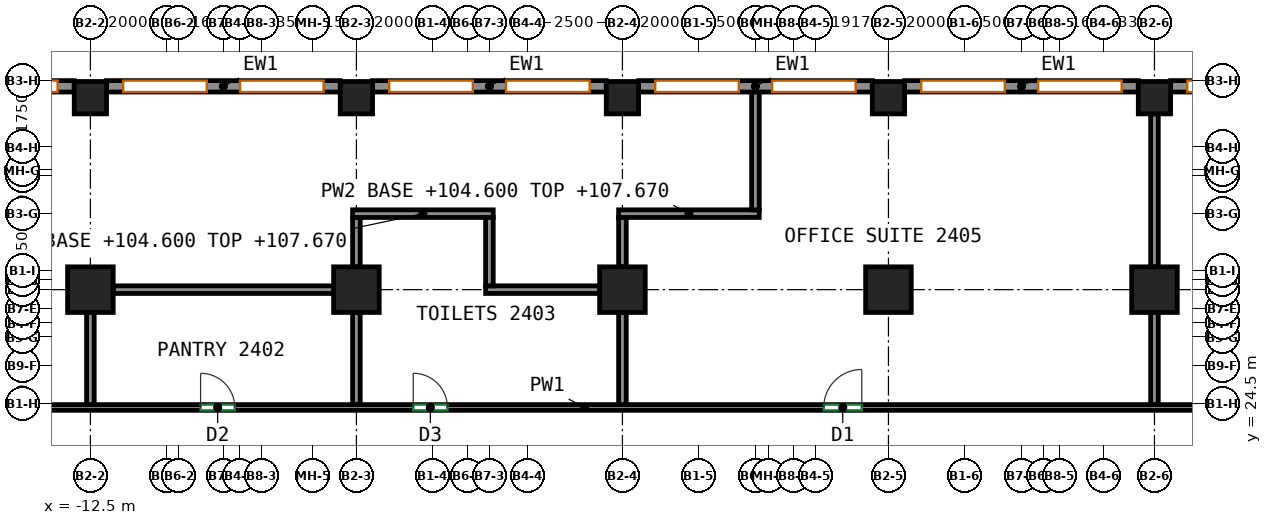
"""IFC4 building model, lengths in metres.
Left out: names, types, materials, properties, quantities, classifications, styles, units other than length and angle.
Written with IfcOpenShell. Run it as: python <this file> out.ifc"""

import sys

from ifc_helpers import new_model, si_unit, direction, frame, frame_2d, origin, origin_2d, place, context, subcontext, project, spatial, rectangle, extrude, source, transform, mapped, element, fill, save


model = new_model("IFC4")
c1 = context("Model", 3, precision=1e-05, world=origin(), true_north=direction((0.0, 1.0)))
c2 = subcontext(c1, "Body", "Model", "MODEL_VIEW")
j1 = project(units=[si_unit("LENGTHUNIT", "METRE"), si_unit("PLANEANGLEUNIT", "RADIAN")], contexts=[c1])
p1 = place(None, origin())
s1 = spatial("IfcSite", under=j1, at=p1, CompositionType="ELEMENT")
p2 = place(p1, origin())
s2 = spatial("IfcBuilding", under=s1, at=p2, CompositionType="ELEMENT")
p3 = place(p2, frame((0.0, 0.0, 104.6)))
s3 = spatial("IfcBuildingStorey", under=s2, at=p3, CompositionType="ELEMENT", Elevation=104.6)
m1 = source(origin(), c2, "Body", "SweptSolid", [
    extrude(rectangle(XDim=1.2, YDim=1.2, at=origin_2d()), origin(), (0.0, 0.0, 1.0), 3.72),
])
p4 = place(p3, frame((-12.5, 27.5, 0.0), z_axis=(0.0, 0.0, 1.0), x_axis=(1.0, 0.0, 0.0)))
e1 = element("IfcColumn", 1, at=p4, inside=s3, PredefinedType="COLUMN", context=c2, shape_type="MappedRepresentation", body=[
    mapped(m1, transform((0.0, 0.0, 0.0))),
])
m2 = source(origin(), c2, "Body", "SweptSolid", [
    extrude(rectangle(XDim=0.85, YDim=0.85, at=origin_2d()), origin(), (0.0, 0.0, 1.0), 3.72),
])
p5 = place(p3, frame((-12.5, 32.55, 0.0), z_axis=(0.0, 0.0, 1.0), x_axis=(1.0, 0.0, 0.0)))
e2 = element("IfcColumn", 2, at=p5, inside=s3, PredefinedType="COLUMN", context=c2, shape_type="MappedRepresentation", body=[
    mapped(m2, transform((0.0, 0.0, 0.0))),
])
p6 = place(p3, frame((-5.5, 27.5, 0.0), z_axis=(0.0, 0.0, 1.0), x_axis=(1.0, 0.0, 0.0)))
e3 = element("IfcColumn", 3, at=p6, inside=s3, PredefinedType="COLUMN", context=c2, shape_type="MappedRepresentation", body=[
    mapped(m1, transform((0.0, 0.0, 0.0))),
])
p7 = place(p3, frame((-5.5, 32.55, 0.0), z_axis=(0.0, 0.0, 1.0), x_axis=(1.0, 0.0, 0.0)))
e4 = element("IfcColumn", 4, at=p7, inside=s3, PredefinedType="COLUMN", context=c2, shape_type="MappedRepresentation", body=[
    mapped(m2, transform((0.0, 0.0, 0.0))),
])
p8 = place(p3, frame((1.5, 27.5, 0.0), z_axis=(0.0, 0.0, 1.0), x_axis=(1.0, 0.0, 0.0)))
e5 = element("IfcColumn", 5, at=p8, inside=s3, PredefinedType="COLUMN", context=c2, shape_type="MappedRepresentation", body=[
    mapped(m1, transform((0.0, 0.0, 0.0))),
])
p9 = place(p3, frame((1.5, 32.55, 0.0), z_axis=(0.0, 0.0, 1.0), x_axis=(1.0, 0.0, 0.0)))
e6 = element("IfcColumn", 6, at=p9, inside=s3, PredefinedType="COLUMN", context=c2, shape_type="MappedRepresentation", body=[
    mapped(m2, transform((0.0, 0.0, 0.0))),
])
p10 = place(p3, frame((8.5, 27.5, 0.0), z_axis=(0.0, 0.0, 1.0), x_axis=(1.0, 0.0, 0.0)))
e7 = element("IfcColumn", 7, at=p10, inside=s3, PredefinedType="COLUMN", context=c2, shape_type="MappedRepresentation", body=[
    mapped(m1, transform((0.0, 0.0, 0.0))),
])
p11 = place(p3, frame((8.5, 32.55, 0.0), z_axis=(0.0, 0.0, 1.0), x_axis=(1.0, 0.0, 0.0)))
e8 = element("IfcColumn", 8, at=p11, inside=s3, PredefinedType="COLUMN", context=c2, shape_type="MappedRepresentation", body=[
    mapped(m2, transform((0.0, 0.0, 0.0))),
])
p12 = place(p3, frame((15.5, 27.5, 0.0), z_axis=(0.0, 0.0, 1.0), x_axis=(1.0, 0.0, 0.0)))
e9 = element("IfcColumn", 9, at=p12, inside=s3, PredefinedType="COLUMN", context=c2, shape_type="MappedRepresentation", body=[
    mapped(m1, transform((0.0, 0.0, 0.0))),
])
p13 = place(p3, frame((15.5, 32.55, 0.0), z_axis=(0.0, 0.0, 1.0), x_axis=(1.0, 0.0, 0.0)))
e10 = element("IfcColumn", 10, at=p13, inside=s3, PredefinedType="COLUMN", context=c2, shape_type="MappedRepresentation", body=[
    mapped(m2, transform((0.0, 0.0, 0.0))),
])
m3 = source(origin(), c2, "Body", "SweptSolid", [
    extrude(rectangle(XDim=6.15, YDim=0.3, at=frame_2d((3.075, 0.0))), origin(), (0.0, 0.0, 1.0), 3.72),
])
p14 = place(p3, frame((22.075, 32.85, 0.0), z_axis=(0.0, 0.0, 1.0), x_axis=(-1.0, 0.0, 0.0)))
e11 = element("IfcWall", 11, at=p14, inside=s3, PredefinedType="SOLIDWALL", context=c2, shape_type="MappedRepresentation", body=[
    mapped(m3, transform((0.0, 0.0, 0.0))),
])
p15 = place(p14, frame((0.438, 0.0, 0.7)))
e12 = element("IfcOpeningElement", 12, at=p15, cuts=e11, PredefinedType="OPENING", context=c2, shape_type="SweptSolid", body=[
    extrude(rectangle(XDim=2.2, YDim=2.25, at=frame_2d((1.1, 1.125))), frame((0.0, 0.16, 0.0), z_axis=(0.0, -1.0, 0.0), x_axis=(1.0, 0.0, 0.0)), (0.0, 0.0, 1.0), 0.32),
])
p16 = place(p14, frame((3.512, 0.0, 0.7)))
e13 = element("IfcOpeningElement", 13, at=p16, cuts=e11, PredefinedType="OPENING", context=c2, shape_type="SweptSolid", body=[
    extrude(rectangle(XDim=2.2, YDim=2.25, at=frame_2d((1.1, 1.125))), frame((0.0, 0.16, 0.0), z_axis=(0.0, -1.0, 0.0), x_axis=(1.0, 0.0, 0.0)), (0.0, 0.0, 1.0), 0.32),
])
p17 = place(p3, frame((15.075, 32.85, 0.0), z_axis=(0.0, 0.0, 1.0), x_axis=(-1.0, 0.0, 0.0)))
e14 = element("IfcWall", 14, at=p17, inside=s3, PredefinedType="SOLIDWALL", context=c2, shape_type="MappedRepresentation", body=[
    mapped(m3, transform((0.0, 0.0, 0.0))),
])
p18 = place(p17, frame((0.438, 0.0, 0.7)))
e15 = element("IfcOpeningElement", 15, at=p18, cuts=e14, PredefinedType="OPENING", context=c2, shape_type="SweptSolid", body=[
    extrude(rectangle(XDim=2.2, YDim=2.25, at=frame_2d((1.1, 1.125))), frame((0.0, 0.16, 0.0), z_axis=(0.0, -1.0, 0.0), x_axis=(1.0, 0.0, 0.0)), (0.0, 0.0, 1.0), 0.32),
])
p19 = place(p17, frame((3.512, 0.0, 0.7)))
e16 = element("IfcOpeningElement", 16, at=p19, cuts=e14, PredefinedType="OPENING", context=c2, shape_type="SweptSolid", body=[
    extrude(rectangle(XDim=2.2, YDim=2.25, at=frame_2d((1.1, 1.125))), frame((0.0, 0.16, 0.0), z_axis=(0.0, -1.0, 0.0), x_axis=(1.0, 0.0, 0.0)), (0.0, 0.0, 1.0), 0.32),
])
p20 = place(p3, frame((8.075, 32.85, 0.0), z_axis=(0.0, 0.0, 1.0), x_axis=(-1.0, 0.0, 0.0)))
e17 = element("IfcWall", 17, at=p20, inside=s3, PredefinedType="SOLIDWALL", context=c2, shape_type="MappedRepresentation", body=[
    mapped(m3, transform((0.0, 0.0, 0.0))),
])
p21 = place(p20, frame((0.438, 0.0, 0.7)))
e18 = element("IfcOpeningElement", 18, at=p21, cuts=e17, PredefinedType="OPENING", context=c2, shape_type="SweptSolid", body=[
    extrude(rectangle(XDim=2.2, YDim=2.25, at=frame_2d((1.1, 1.125))), frame((0.0, 0.16, 0.0), z_axis=(0.0, -1.0, 0.0), x_axis=(1.0, 0.0, 0.0)), (0.0, 0.0, 1.0), 0.32),
])
p22 = place(p20, frame((3.512, 0.0, 0.7)))
e19 = element("IfcOpeningElement", 19, at=p22, cuts=e17, PredefinedType="OPENING", context=c2, shape_type="SweptSolid", body=[
    extrude(rectangle(XDim=2.2, YDim=2.25, at=frame_2d((1.1, 1.125))), frame((0.0, 0.16, 0.0), z_axis=(0.0, -1.0, 0.0), x_axis=(1.0, 0.0, 0.0)), (0.0, 0.0, 1.0), 0.32),
])
p23 = place(p3, frame((1.075, 32.85, 0.0), z_axis=(0.0, 0.0, 1.0), x_axis=(-1.0, 0.0, 0.0)))
e20 = element("IfcWall", 20, at=p23, inside=s3, PredefinedType="SOLIDWALL", context=c2, shape_type="MappedRepresentation", body=[
    mapped(m3, transform((0.0, 0.0, 0.0))),
])
p24 = place(p23, frame((0.438, 0.0, 0.7)))
e21 = element("IfcOpeningElement", 21, at=p24, cuts=e20, PredefinedType="OPENING", context=c2, shape_type="SweptSolid", body=[
    extrude(rectangle(XDim=2.2, YDim=2.25, at=frame_2d((1.1, 1.125))), frame((0.0, 0.16, 0.0), z_axis=(0.0, -1.0, 0.0), x_axis=(1.0, 0.0, 0.0)), (0.0, 0.0, 1.0), 0.32),
])
p25 = place(p23, frame((3.512, 0.0, 0.7)))
e22 = element("IfcOpeningElement", 22, at=p25, cuts=e20, PredefinedType="OPENING", context=c2, shape_type="SweptSolid", body=[
    extrude(rectangle(XDim=2.2, YDim=2.25, at=frame_2d((1.1, 1.125))), frame((0.0, 0.16, 0.0), z_axis=(0.0, -1.0, 0.0), x_axis=(1.0, 0.0, 0.0)), (0.0, 0.0, 1.0), 0.32),
])
p26 = place(p3, frame((-5.925, 32.85, 0.0), z_axis=(0.0, 0.0, 1.0), x_axis=(-1.0, 0.0, 0.0)))
e23 = element("IfcWall", 23, at=p26, inside=s3, PredefinedType="SOLIDWALL", context=c2, shape_type="MappedRepresentation", body=[
    mapped(m3, transform((0.0, 0.0, 0.0))),
])
p27 = place(p26, frame((0.438, 0.0, 0.7)))
e24 = element("IfcOpeningElement", 24, at=p27, cuts=e23, PredefinedType="OPENING", context=c2, shape_type="SweptSolid", body=[
    extrude(rectangle(XDim=2.2, YDim=2.25, at=frame_2d((1.1, 1.125))), frame((0.0, 0.16, 0.0), z_axis=(0.0, -1.0, 0.0), x_axis=(1.0, 0.0, 0.0)), (0.0, 0.0, 1.0), 0.32),
])
p28 = place(p26, frame((3.512, 0.0, 0.7)))
e25 = element("IfcOpeningElement", 25, at=p28, cuts=e23, PredefinedType="OPENING", context=c2, shape_type="SweptSolid", body=[
    extrude(rectangle(XDim=2.2, YDim=2.25, at=frame_2d((1.1, 1.125))), frame((0.0, 0.16, 0.0), z_axis=(0.0, -1.0, 0.0), x_axis=(1.0, 0.0, 0.0)), (0.0, 0.0, 1.0), 0.32),
])
p29 = place(p3, frame((-12.925, 32.85, 0.0), z_axis=(0.0, 0.0, 1.0), x_axis=(-1.0, 0.0, 0.0)))
e26 = element("IfcWall", 26, at=p29, inside=s3, PredefinedType="SOLIDWALL", context=c2, shape_type="MappedRepresentation", body=[
    mapped(m3, transform((0.0, 0.0, 0.0))),
])
p30 = place(p29, frame((0.438, 0.0, 0.7)))
e27 = element("IfcOpeningElement", 27, at=p30, cuts=e26, PredefinedType="OPENING", context=c2, shape_type="SweptSolid", body=[
    extrude(rectangle(XDim=2.2, YDim=2.25, at=frame_2d((1.1, 1.125))), frame((0.0, 0.16, 0.0), z_axis=(0.0, -1.0, 0.0), x_axis=(1.0, 0.0, 0.0)), (0.0, 0.0, 1.0), 0.32),
])
p31 = place(p29, frame((3.512, 0.0, 0.7)))
e28 = element("IfcOpeningElement", 28, at=p31, cuts=e26, PredefinedType="OPENING", context=c2, shape_type="SweptSolid", body=[
    extrude(rectangle(XDim=2.2, YDim=2.25, at=frame_2d((1.1, 1.125))), frame((0.0, 0.16, 0.0), z_axis=(0.0, -1.0, 0.0), x_axis=(1.0, 0.0, 0.0)), (0.0, 0.0, 1.0), 0.32),
])
p32 = place(p3, frame((-19.575, 24.4, 0.0), z_axis=(0.0, 0.0, 1.0), x_axis=(1.0, 0.0, 0.0)))
e29 = element("IfcWall", 29, at=p32, inside=s3, PredefinedType="PARTITIONING", context=c2, shape_type="SweptSolid", body=[
    extrude(rectangle(XDim=40.15, YDim=0.15, at=frame_2d((20.075, 0.0))), origin(), (0.0, 0.0, 1.0), 3.72),
])
p33 = place(p32, frame((9.974, 0.0, 0.0)))
e30 = element("IfcOpeningElement", 30, at=p33, cuts=e29, PredefinedType="OPENING", context=c2, shape_type="SweptSolid", body=[
    extrude(rectangle(XDim=0.9, YDim=2.1, at=frame_2d((0.45, 1.05))), frame((0.0, 0.085, 0.0), z_axis=(0.0, -1.0, 0.0), x_axis=(1.0, 0.0, 0.0)), (0.0, 0.0, 1.0), 0.17),
])
p34 = place(p32, frame((15.57, 0.0, 0.0)))
e31 = element("IfcOpeningElement", 31, at=p34, cuts=e29, PredefinedType="OPENING", context=c2, shape_type="SweptSolid", body=[
    extrude(rectangle(XDim=0.9, YDim=2.1, at=frame_2d((0.45, 1.05))), frame((0.0, 0.085, 0.0), z_axis=(0.0, -1.0, 0.0), x_axis=(1.0, 0.0, 0.0)), (0.0, 0.0, 1.0), 0.17),
])
p35 = place(p32, frame((26.373, 0.0, 0.0)))
e32 = element("IfcOpeningElement", 32, at=p35, cuts=e29, PredefinedType="OPENING", context=c2, shape_type="SweptSolid", body=[
    extrude(rectangle(XDim=1.0, YDim=2.1, at=frame_2d((0.5, 1.05))), frame((0.0, 0.085, 0.0), z_axis=(0.0, -1.0, 0.0), x_axis=(1.0, 0.0, 0.0)), (0.0, 0.0, 1.0), 0.17),
])
p36 = place(p32, frame((37.619, 0.0, 0.0)))
e33 = element("IfcOpeningElement", 33, at=p36, cuts=e29, PredefinedType="OPENING", context=c2, shape_type="SweptSolid", body=[
    extrude(rectangle(XDim=1.0, YDim=2.1, at=frame_2d((0.5, 1.05))), frame((0.0, 0.085, 0.0), z_axis=(0.0, -1.0, 0.0), x_axis=(1.0, 0.0, 0.0)), (0.0, 0.0, 1.0), 0.17),
])
p37 = place(p3, frame((15.5, 28.1, 0.0), z_axis=(0.0, 0.0, 1.0), x_axis=(0.0, 1.0, 0.0)))
e34 = element("IfcWall", 34, at=p37, inside=s3, PredefinedType="PARTITIONING", context=c2, shape_type="SweptSolid", body=[
    extrude(rectangle(XDim=4.025, YDim=0.2, at=frame_2d((2.012, 0.0))), origin(), (0.0, 0.0, 1.0), 3.72),
])
for number, where, z_axis, x_axis in (
    (35, (15.5, 24.476, 0.0), (0.0, 0.0, 1.0), (0.0, 1.0, 0.0)),
    (36, (1.5, 24.476, 0.0), (0.0, 0.0, 1.0), (0.0, 1.0, 0.0)),
):
    element("IfcWall", number, at=place(p3, frame(where, z_axis=z_axis, x_axis=x_axis)), inside=s3, PredefinedType="PARTITIONING", context=c2, shape_type="SweptSolid", body=[
        extrude(rectangle(XDim=2.424, YDim=0.2, at=frame_2d((1.212, 0.0))), origin(), (0.0, 0.0, 1.0), 3.72),
    ])
p38 = place(p3, frame((1.5, 28.1, 0.0), z_axis=(0.0, 0.0, 1.0), x_axis=(0.0, 1.0, 0.0)))
e37 = element("IfcWall", 37, at=p38, inside=s3, PredefinedType="PARTITIONING", context=c2, shape_type="SweptSolid", body=[
    extrude(rectangle(XDim=1.3, YDim=0.2, at=frame_2d((0.65, 0.0))), origin(), (0.0, 0.0, 1.0), 3.72),
])
p39 = place(p3, frame((1.4, 29.5, 0.0), z_axis=(0.0, 0.0, 1.0), x_axis=(1.0, 0.0, 0.0)))
e38 = element("IfcWall", 38, at=p39, inside=s3, PredefinedType="PARTITIONING", context=c2, shape_type="SweptSolid", body=[
    extrude(rectangle(XDim=3.7, YDim=0.2, at=frame_2d((1.85, 0.0))), origin(), (0.0, 0.0, 1.0), 3.07),
])
p40 = place(p3, frame((5.0, 29.6, 0.0), z_axis=(0.0, 0.0, 1.0), x_axis=(0.0, 1.0, 0.0)))
e39 = element("IfcWall", 39, at=p40, inside=s3, PredefinedType="PARTITIONING", context=c2, shape_type="SweptSolid", body=[
    extrude(rectangle(XDim=3.15, YDim=0.2, at=frame_2d((1.575, 0.0))), origin(), (0.0, 0.0, 1.0), 3.72),
])
p41 = place(p3, frame((-5.5, 24.476, 0.0), z_axis=(0.0, 0.0, 1.0), x_axis=(0.0, 1.0, 0.0)))
e40 = element("IfcWall", 40, at=p41, inside=s3, PredefinedType="PARTITIONING", context=c2, shape_type="SweptSolid", body=[
    extrude(rectangle(XDim=2.424, YDim=0.2, at=frame_2d((1.212, 0.0))), origin(), (0.0, 0.0, 1.0), 3.72),
])
p42 = place(p3, frame((-2.1, 27.5, 0.0), z_axis=(0.0, 0.0, 1.0), x_axis=(1.0, 0.0, 0.0)))
e41 = element("IfcWall", 41, at=p42, inside=s3, PredefinedType="PARTITIONING", context=c2, shape_type="SweptSolid", body=[
    extrude(rectangle(XDim=3.0, YDim=0.2, at=frame_2d((1.5, 0.0))), origin(), (0.0, 0.0, 1.0), 3.72),
])
p43 = place(p3, frame((-5.5, 28.1, 0.0), z_axis=(0.0, 0.0, 1.0), x_axis=(0.0, 1.0, 0.0)))
e42 = element("IfcWall", 42, at=p43, inside=s3, PredefinedType="PARTITIONING", context=c2, shape_type="SweptSolid", body=[
    extrude(rectangle(XDim=1.3, YDim=0.2, at=frame_2d((0.65, 0.0))), origin(), (0.0, 0.0, 1.0), 3.72),
])
p44 = place(p3, frame((-5.6, 29.5, 0.0), z_axis=(0.0, 0.0, 1.0), x_axis=(1.0, 0.0, 0.0)))
e43 = element("IfcWall", 43, at=p44, inside=s3, PredefinedType="PARTITIONING", context=c2, shape_type="SweptSolid", body=[
    extrude(rectangle(XDim=3.7, YDim=0.2, at=frame_2d((1.85, 0.0))), origin(), (0.0, 0.0, 1.0), 3.07),
])
p45 = place(p3, frame((-2.0, 27.6, 0.0), z_axis=(0.0, 0.0, 1.0), x_axis=(0.0, 1.0, 0.0)))
e44 = element("IfcWall", 44, at=p45, inside=s3, PredefinedType="PARTITIONING", context=c2, shape_type="SweptSolid", body=[
    extrude(rectangle(XDim=1.8, YDim=0.2, at=frame_2d((0.9, 0.0))), origin(), (0.0, 0.0, 1.0), 3.72),
])
p46 = place(p3, frame((-12.5, 26.9, 0.0), z_axis=(0.0, 0.0, 1.0), x_axis=(0.0, -1.0, 0.0)))
e45 = element("IfcWall", 45, at=p46, inside=s3, PredefinedType="PARTITIONING", context=c2, shape_type="SweptSolid", body=[
    extrude(rectangle(XDim=2.424, YDim=0.2, at=frame_2d((1.212, 0.0))), origin(), (0.0, 0.0, 1.0), 3.72),
])
p47 = place(p3, frame((-11.9, 27.5, 0.0), z_axis=(0.0, 0.0, 1.0), x_axis=(1.0, 0.0, 0.0)))
e46 = element("IfcWall", 46, at=p47, inside=s3, PredefinedType="PARTITIONING", context=c2, shape_type="SweptSolid", body=[
    extrude(rectangle(XDim=5.8, YDim=0.2, at=frame_2d((2.9, 0.0))), origin(), (0.0, 0.0, 1.0), 3.72),
])
p48 = place(p16, origin())
e47 = element("IfcWindow", 47, at=p48, inside=s3, PartitioningType="SINGLE_PANEL", PredefinedType="WINDOW", context=c2, shape_type="SweptSolid", body=[
    extrude(rectangle(XDim=2.2, YDim=2.25, at=frame_2d((1.1, 1.125))), frame((0.0, 0.03, 0.0), z_axis=(0.0, -1.0, 0.0), x_axis=(1.0, 0.0, 0.0)), (0.0, 0.0, 1.0), 0.06),
])
fill(e13, e47)
p49 = place(p18, origin())
e48 = element("IfcWindow", 48, at=p49, inside=s3, PartitioningType="SINGLE_PANEL", PredefinedType="WINDOW", context=c2, shape_type="SweptSolid", body=[
    extrude(rectangle(XDim=2.2, YDim=2.25, at=frame_2d((1.1, 1.125))), frame((0.0, 0.03, 0.0), z_axis=(0.0, -1.0, 0.0), x_axis=(1.0, 0.0, 0.0)), (0.0, 0.0, 1.0), 0.06),
])
fill(e15, e48)
p50 = place(p19, origin())
e49 = element("IfcWindow", 49, at=p50, inside=s3, PartitioningType="SINGLE_PANEL", PredefinedType="WINDOW", context=c2, shape_type="SweptSolid", body=[
    extrude(rectangle(XDim=2.2, YDim=2.25, at=frame_2d((1.1, 1.125))), frame((0.0, 0.03, 0.0), z_axis=(0.0, -1.0, 0.0), x_axis=(1.0, 0.0, 0.0)), (0.0, 0.0, 1.0), 0.06),
])
fill(e16, e49)
p51 = place(p21, origin())
e50 = element("IfcWindow", 50, at=p51, inside=s3, PartitioningType="SINGLE_PANEL", PredefinedType="WINDOW", context=c2, shape_type="SweptSolid", body=[
    extrude(rectangle(XDim=2.2, YDim=2.25, at=frame_2d((1.1, 1.125))), frame((0.0, 0.03, 0.0), z_axis=(0.0, -1.0, 0.0), x_axis=(1.0, 0.0, 0.0)), (0.0, 0.0, 1.0), 0.06),
])
fill(e18, e50)
p52 = place(p22, origin())
e51 = element("IfcWindow", 51, at=p52, inside=s3, PartitioningType="SINGLE_PANEL", PredefinedType="WINDOW", context=c2, shape_type="SweptSolid", body=[
    extrude(rectangle(XDim=2.2, YDim=2.25, at=frame_2d((1.1, 1.125))), frame((0.0, 0.03, 0.0), z_axis=(0.0, -1.0, 0.0), x_axis=(1.0, 0.0, 0.0)), (0.0, 0.0, 1.0), 0.06),
])
fill(e19, e51)
p53 = place(p24, origin())
e52 = element("IfcWindow", 52, at=p53, inside=s3, PartitioningType="SINGLE_PANEL", PredefinedType="WINDOW", context=c2, shape_type="SweptSolid", body=[
    extrude(rectangle(XDim=2.2, YDim=2.25, at=frame_2d((1.1, 1.125))), frame((0.0, 0.03, 0.0), z_axis=(0.0, -1.0, 0.0), x_axis=(1.0, 0.0, 0.0)), (0.0, 0.0, 1.0), 0.06),
])
fill(e21, e52)
p54 = place(p25, origin())
e53 = element("IfcWindow", 53, at=p54, inside=s3, PartitioningType="SINGLE_PANEL", PredefinedType="WINDOW", context=c2, shape_type="SweptSolid", body=[
    extrude(rectangle(XDim=2.2, YDim=2.25, at=frame_2d((1.1, 1.125))), frame((0.0, 0.03, 0.0), z_axis=(0.0, -1.0, 0.0), x_axis=(1.0, 0.0, 0.0)), (0.0, 0.0, 1.0), 0.06),
])
fill(e22, e53)
p55 = place(p27, origin())
e54 = element("IfcWindow", 54, at=p55, inside=s3, PartitioningType="SINGLE_PANEL", PredefinedType="WINDOW", context=c2, shape_type="SweptSolid", body=[
    extrude(rectangle(XDim=2.2, YDim=2.25, at=frame_2d((1.1, 1.125))), frame((0.0, 0.03, 0.0), z_axis=(0.0, -1.0, 0.0), x_axis=(1.0, 0.0, 0.0)), (0.0, 0.0, 1.0), 0.06),
])
fill(e24, e54)
p56 = place(p28, origin())
e55 = element("IfcWindow", 55, at=p56, inside=s3, PartitioningType="SINGLE_PANEL", PredefinedType="WINDOW", context=c2, shape_type="SweptSolid", body=[
    extrude(rectangle(XDim=2.2, YDim=2.25, at=frame_2d((1.1, 1.125))), frame((0.0, 0.03, 0.0), z_axis=(0.0, -1.0, 0.0), x_axis=(1.0, 0.0, 0.0)), (0.0, 0.0, 1.0), 0.06),
])
fill(e25, e55)
p57 = place(p30, origin())
e56 = element("IfcWindow", 56, at=p57, inside=s3, PartitioningType="SINGLE_PANEL", PredefinedType="WINDOW", context=c2, shape_type="SweptSolid", body=[
    extrude(rectangle(XDim=2.2, YDim=2.25, at=frame_2d((1.1, 1.125))), frame((0.0, 0.03, 0.0), z_axis=(0.0, -1.0, 0.0), x_axis=(1.0, 0.0, 0.0)), (0.0, 0.0, 1.0), 0.06),
])
fill(e27, e56)
p58 = place(p33, origin())
e57 = element("IfcDoor", 57, at=p58, inside=s3, OperationType="SINGLE_SWING_LEFT", PredefinedType="DOOR", context=c2, shape_type="SweptSolid", body=[
    extrude(rectangle(XDim=0.9, YDim=2.1, at=frame_2d((0.45, 1.05))), frame((0.0, 0.025, 0.0), z_axis=(0.0, -1.0, 0.0), x_axis=(1.0, 0.0, 0.0)), (0.0, 0.0, 1.0), 0.05),
])
fill(e30, e57)
p59 = place(p34, origin())
e58 = element("IfcDoor", 58, at=p59, inside=s3, OperationType="SINGLE_SWING_LEFT", PredefinedType="DOOR", context=c2, shape_type="SweptSolid", body=[
    extrude(rectangle(XDim=0.9, YDim=2.1, at=frame_2d((0.45, 1.05))), frame((0.0, 0.025, 0.0), z_axis=(0.0, -1.0, 0.0), x_axis=(1.0, 0.0, 0.0)), (0.0, 0.0, 1.0), 0.05),
])
fill(e31, e58)
p60 = place(p35, origin())
e59 = element("IfcDoor", 59, at=p60, inside=s3, OperationType="SINGLE_SWING_RIGHT", PredefinedType="DOOR", context=c2, shape_type="SweptSolid", body=[
    extrude(rectangle(XDim=1.0, YDim=2.1, at=frame_2d((0.5, 1.05))), frame((0.0, 0.025, 0.0), z_axis=(0.0, -1.0, 0.0), x_axis=(1.0, 0.0, 0.0)), (0.0, 0.0, 1.0), 0.05),
])
fill(e32, e59)
save(model, sys.argv[1])
